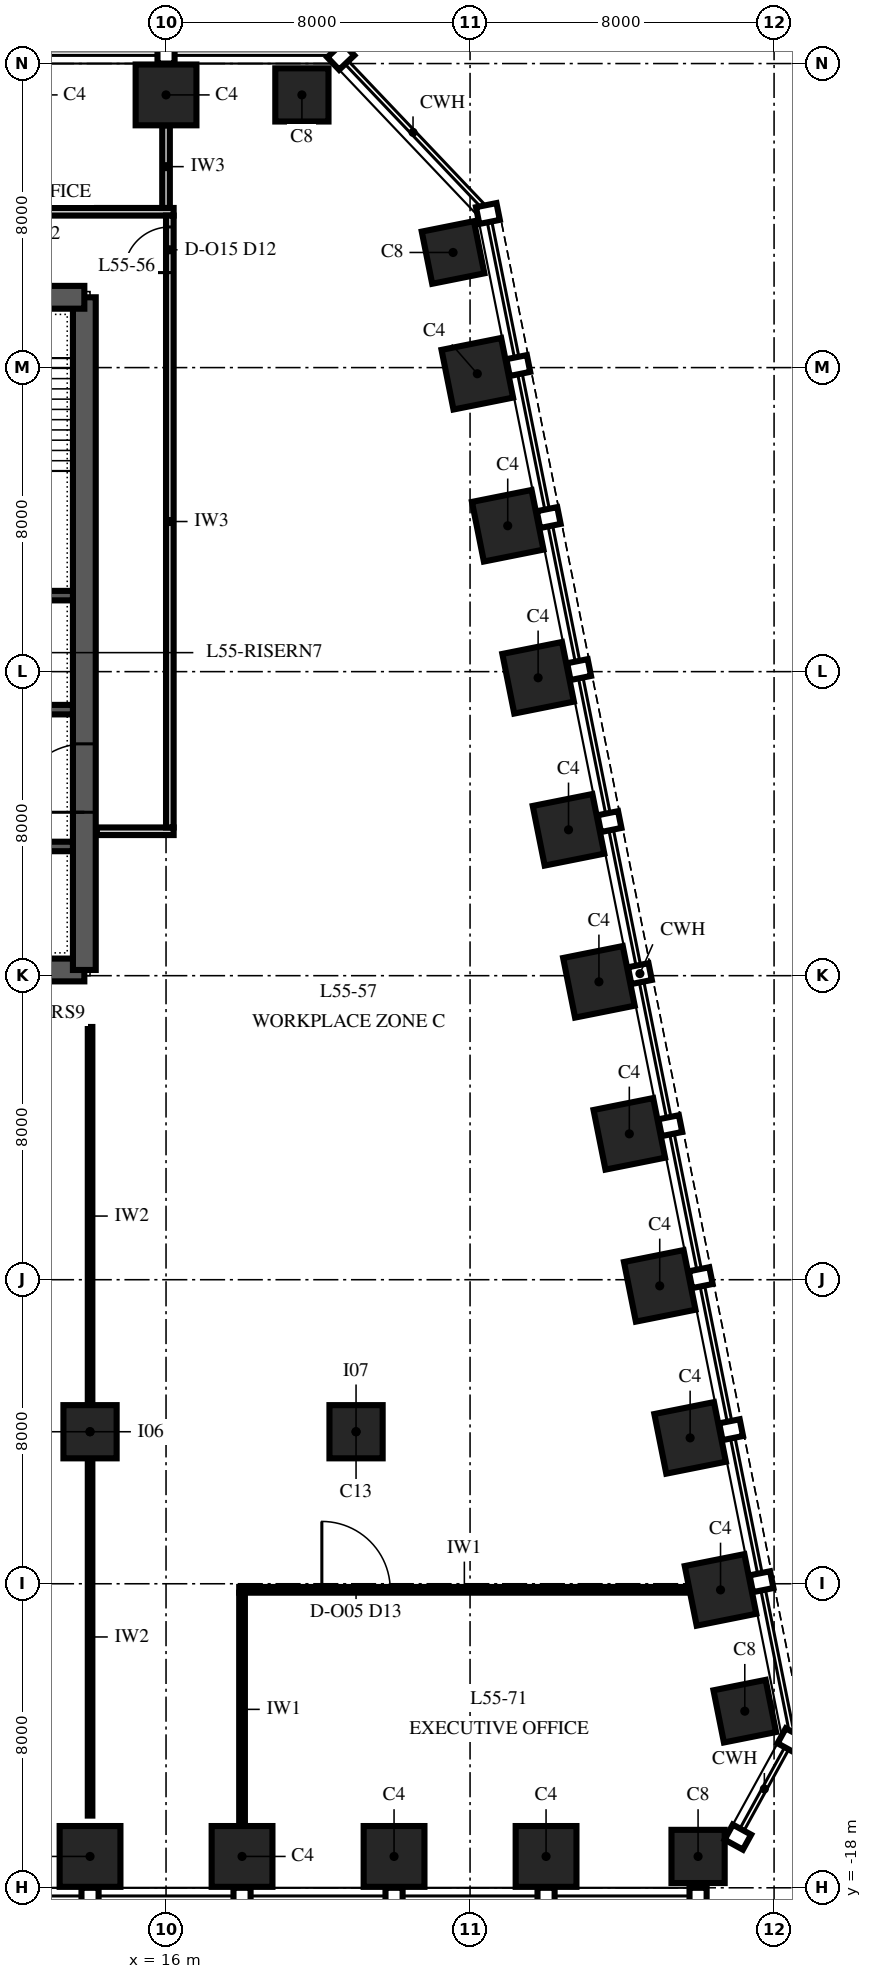
"""IFC4 building model, lengths in metres.
Left out: names, types, materials, properties, quantities, classifications, styles, units other than length and angle.
Written with IfcOpenShell. Run it as: python <this file> out.ifc"""

import sys

from ifc_helpers import new_model, si_unit, direction, frame, frame_2d, origin, origin_2d, place, context, subcontext, project, spatial, polyline, rectangle, outline, extrude, element, fill, save


model = new_model("IFC4")
c1 = context("Model", 3, precision=1e-05, world=origin(), true_north=direction((0.0, 1.0)))
c2 = subcontext(c1, "Body", "Model", "MODEL_VIEW")
j1 = project(units=[si_unit("LENGTHUNIT", "METRE"), si_unit("PLANEANGLEUNIT", "RADIAN")], contexts=[c1])
p1 = place(None, origin())
s1 = spatial("IfcSite", under=j1, at=p1, CompositionType="ELEMENT")
p2 = place(p1, origin())
s2 = spatial("IfcBuilding", under=s1, at=p2, CompositionType="ELEMENT")
p3 = place(p2, frame((0.0, 0.0, 238.0)))
s3 = spatial("IfcBuildingStorey", under=s2, at=p3, CompositionType="ELEMENT", Elevation=238.0)
for number, where, z_axis, x_axis in (
    (1, (14.0, -17.175, 0.0), (0.0, 0.0, 1.0), (1.0, 0.0, 0.0)),
    (2, (18.0, -17.175, 0.0), (0.0, 0.0, 1.0), (1.0, 0.0, 0.0)),
    (3, (22.0, -17.175, 0.0), (0.0, 0.0, 1.0), (1.0, 0.0, 0.0)),
    (4, (26.0, -17.175, 0.0), (0.0, 0.0, 1.0), (1.0, 0.0, 0.0)),
):
    element("IfcColumn", number, at=place(p3, frame(where, z_axis=z_axis, x_axis=x_axis)), inside=s3, PredefinedType="COLUMN", context=c2, shape_type="SweptSolid", body=[
        extrude(rectangle(XDim=1.6, YDim=1.6, at=origin_2d()), origin(), (0.0, 0.0, 1.0), 4.0),
    ])
for number, where, z_axis, x_axis in (
    (5, (30.0, -17.175, 0.0), (0.0, 0.0, 1.0), (1.0, 0.0, 0.0)),
    (6, (31.229, -13.353, 0.0), (0.0, 0.0, 1.0), (-0.196, 0.981, 0.0)),
):
    element("IfcColumn", number, at=place(p3, frame(where, z_axis=z_axis, x_axis=x_axis)), inside=s3, PredefinedType="COLUMN", context=c2, shape_type="SweptSolid", body=[
        extrude(rectangle(XDim=1.4, YDim=1.4, at=origin_2d()), origin(), (0.0, 0.0, 1.0), 4.0),
    ])
for number, where, z_axis, x_axis in (
    (7, (30.591, -10.162, 0.0), (0.0, 0.0, 1.0), (-0.196, 0.981, 0.0)),
    (8, (29.791, -6.162, 0.0), (0.0, 0.0, 1.0), (-0.196, 0.981, 0.0)),
    (9, (28.991, -2.162, 0.0), (0.0, 0.0, 1.0), (-0.196, 0.981, 0.0)),
    (10, (28.191, 1.838, 0.0), (0.0, 0.0, 1.0), (-0.196, 0.981, 0.0)),
    (11, (27.391, 5.838, 0.0), (0.0, 0.0, 1.0), (-0.196, 0.981, 0.0)),
    (12, (26.591, 9.838, 0.0), (0.0, 0.0, 1.0), (-0.196, 0.981, 0.0)),
    (13, (25.791, 13.838, 0.0), (0.0, 0.0, 1.0), (-0.196, 0.981, 0.0)),
    (14, (24.991, 17.838, 0.0), (0.0, 0.0, 1.0), (-0.196, 0.981, 0.0)),
    (15, (24.191, 21.838, 0.0), (0.0, 0.0, 1.0), (-0.196, 0.981, 0.0)),
):
    element("IfcColumn", number, at=place(p3, frame(where, z_axis=z_axis, x_axis=x_axis)), inside=s3, PredefinedType="COLUMN", context=c2, shape_type="SweptSolid", body=[
        extrude(rectangle(XDim=1.6, YDim=1.6, at=origin_2d()), origin(), (0.0, 0.0, 1.0), 4.0),
    ])
for number, where, z_axis, x_axis in (
    (16, (23.553, 25.029, 0.0), (0.0, 0.0, 1.0), (-0.196, 0.981, 0.0)),
    (17, (19.575, 29.175, 0.0), (0.0, 0.0, 1.0), (-1.0, 0.0, 0.0)),
):
    element("IfcColumn", number, at=place(p3, frame(where, z_axis=z_axis, x_axis=x_axis)), inside=s3, PredefinedType="COLUMN", context=c2, shape_type="SweptSolid", body=[
        extrude(rectangle(XDim=1.4, YDim=1.4, at=origin_2d()), origin(), (0.0, 0.0, 1.0), 4.0),
    ])
p4 = place(p3, frame((16.0, 29.175, 0.0), z_axis=(0.0, 0.0, 1.0), x_axis=(-1.0, 0.0, 0.0)))
e18 = element("IfcColumn", 18, at=p4, inside=s3, PredefinedType="COLUMN", context=c2, shape_type="SweptSolid", body=[
    extrude(rectangle(XDim=1.6, YDim=1.6, at=origin_2d()), origin(), (0.0, 0.0, 1.0), 4.0),
])
for number, where, z_axis, x_axis in (
    (19, (14.0, -6.0, 0.0), (0.0, 0.0, 1.0), (1.0, 0.0, 0.0)),
    (20, (21.0, -6.0, 0.0), (0.0, 0.0, 1.0), (1.0, 0.0, 0.0)),
):
    element("IfcColumn", number, at=place(p3, frame(where, z_axis=z_axis, x_axis=x_axis)), inside=s3, PredefinedType="COLUMN", context=c2, shape_type="SweptSolid", body=[
        extrude(rectangle(XDim=1.4, YDim=1.4, at=origin_2d()), origin(), (0.0, 0.0, 1.0), 4.0),
    ])
p5 = place(p3, frame((-13.85, 6.15, 0.0), z_axis=(0.0, 0.0, 1.0), x_axis=(1.0, 0.0, 0.0)))
e21 = element("IfcWall", 21, at=p5, inside=s3, PredefinedType="SHEAR", context=c2, shape_type="SweptSolid", body=[
    extrude(rectangle(XDim=27.7, YDim=0.6, at=frame_2d((13.85, 0.0))), origin(), (0.0, 0.0, 1.0), 4.0),
])
p6 = place(p3, frame((13.85, 6.15, 0.0), z_axis=(0.0, 0.0, 1.0), x_axis=(0.0, 1.0, 0.0)))
e22 = element("IfcWall", 22, at=p6, inside=s3, PredefinedType="SHEAR", context=c2, shape_type="SweptSolid", body=[
    extrude(outline(polyline([(0.0, -0.3), (17.7, -0.3), (17.7, 0.0), (17.4, 0.0), (17.4, 0.3), (0.3, 0.3), (0.3, 0.0), (0.0, 0.0), (0.0, -0.3)])), origin(), (0.0, 0.0, 1.0), 4.0),
])
p7 = place(p6, frame((4.15, 0.0, 0.0)))
e23 = element("IfcOpeningElement", 23, at=p7, cuts=e22, PredefinedType="OPENING", context=c2, shape_type="SweptSolid", body=[
    extrude(rectangle(XDim=1.8, YDim=2.4, at=frame_2d((0.9, 1.2))), frame((0.0, 0.315, 0.0), z_axis=(0.0, -1.0, 0.0), x_axis=(1.0, 0.0, 0.0)), (0.0, 0.0, 1.0), 0.63),
])
p8 = place(p3, frame((13.85, 23.85, 0.0), z_axis=(0.0, 0.0, 1.0), x_axis=(-1.0, 0.0, 0.0)))
e24 = element("IfcWall", 24, at=p8, inside=s3, PredefinedType="SHEAR", context=c2, shape_type="SweptSolid", body=[
    extrude(rectangle(XDim=27.7, YDim=0.6, at=frame_2d((13.85, 0.0))), origin(), (0.0, 0.0, 1.0), 4.0),
])
p9 = place(p8, frame((21.75, 0.0, 0.0)))
e25 = element("IfcOpeningElement", 25, at=p9, cuts=e24, PredefinedType="OPENING", context=c2, shape_type="SweptSolid", body=[
    extrude(rectangle(XDim=1.0, YDim=2.1, at=frame_2d((0.5, 1.05))), frame((0.0, 0.315, 0.0), z_axis=(0.0, -1.0, 0.0), x_axis=(1.0, 0.0, 0.0)), (0.0, 0.0, 1.0), 0.63),
])
p10 = place(p8, frame((4.95, 0.0, 0.0)))
e26 = element("IfcOpeningElement", 26, at=p10, cuts=e24, PredefinedType="OPENING", context=c2, shape_type="SweptSolid", body=[
    extrude(rectangle(XDim=1.0, YDim=2.1, at=frame_2d((0.5, 1.05))), frame((0.0, 0.315, 0.0), z_axis=(0.0, -1.0, 0.0), x_axis=(1.0, 0.0, 0.0)), (0.0, 0.0, 1.0), 0.63),
])
p11 = place(p8, frame((17.35, 0.0, 0.0)))
e27 = element("IfcOpeningElement", 27, at=p11, cuts=e24, PredefinedType="OPENING", context=c2, shape_type="SweptSolid", body=[
    extrude(rectangle(XDim=1.0, YDim=2.1, at=frame_2d((0.5, 1.05))), frame((0.0, 0.315, 0.0), z_axis=(0.0, -1.0, 0.0), x_axis=(1.0, 0.0, 0.0)), (0.0, 0.0, 1.0), 0.63),
])
p12 = place(p8, frame((13.35, 0.0, 0.0)))
e28 = element("IfcOpeningElement", 28, at=p12, cuts=e24, PredefinedType="OPENING", context=c2, shape_type="SweptSolid", body=[
    extrude(rectangle(XDim=1.0, YDim=2.1, at=frame_2d((0.5, 1.05))), frame((0.0, 0.315, 0.0), z_axis=(0.0, -1.0, 0.0), x_axis=(1.0, 0.0, 0.0)), (0.0, 0.0, 1.0), 0.63),
])
p13 = place(p8, frame((9.35, 0.0, 0.0)))
e29 = element("IfcOpeningElement", 29, at=p13, cuts=e24, PredefinedType="OPENING", context=c2, shape_type="SweptSolid", body=[
    extrude(rectangle(XDim=1.0, YDim=2.1, at=frame_2d((0.5, 1.05))), frame((0.0, 0.315, 0.0), z_axis=(0.0, -1.0, 0.0), x_axis=(1.0, 0.0, 0.0)), (0.0, 0.0, 1.0), 0.63),
])
p14 = place(p3, frame((-13.55, 9.4, 0.0), z_axis=(0.0, 0.0, 1.0), x_axis=(1.0, 0.0, 0.0)))
e30 = element("IfcWall", 30, at=p14, inside=s3, PredefinedType="SHEAR", context=c2, shape_type="SweptSolid", body=[
    extrude(rectangle(XDim=27.1, YDim=0.25, at=frame_2d((13.55, 0.0))), origin(), (0.0, 0.0, 1.0), 4.0),
])
p15 = place(p14, frame((0.4, 0.0, 0.0)))
e31 = element("IfcOpeningElement", 31, at=p15, cuts=e30, PredefinedType="OPENING", context=c2, shape_type="SweptSolid", body=[
    extrude(rectangle(XDim=1.1, YDim=2.1, at=frame_2d((0.55, 1.05))), frame((0.0, 0.14, 0.0), z_axis=(0.0, -1.0, 0.0), x_axis=(1.0, 0.0, 0.0)), (0.0, 0.0, 1.0), 0.28),
])
p16 = place(p14, frame((3.2, 0.0, 0.0)))
e32 = element("IfcOpeningElement", 32, at=p16, cuts=e30, PredefinedType="OPENING", context=c2, shape_type="SweptSolid", body=[
    extrude(rectangle(XDim=1.1, YDim=2.1, at=frame_2d((0.55, 1.05))), frame((0.0, 0.14, 0.0), z_axis=(0.0, -1.0, 0.0), x_axis=(1.0, 0.0, 0.0)), (0.0, 0.0, 1.0), 0.28),
])
p17 = place(p14, frame((6.0, 0.0, 0.0)))
e33 = element("IfcOpeningElement", 33, at=p17, cuts=e30, PredefinedType="OPENING", context=c2, shape_type="SweptSolid", body=[
    extrude(rectangle(XDim=1.1, YDim=2.1, at=frame_2d((0.55, 1.05))), frame((0.0, 0.14, 0.0), z_axis=(0.0, -1.0, 0.0), x_axis=(1.0, 0.0, 0.0)), (0.0, 0.0, 1.0), 0.28),
])
p18 = place(p14, frame((17.3, 0.0, 0.0)))
e34 = element("IfcOpeningElement", 34, at=p18, cuts=e30, PredefinedType="OPENING", context=c2, shape_type="SweptSolid", body=[
    extrude(rectangle(XDim=0.9, YDim=2.1, at=frame_2d((0.45, 1.05))), frame((0.0, 0.14, 0.0), z_axis=(0.0, -1.0, 0.0), x_axis=(1.0, 0.0, 0.0)), (0.0, 0.0, 1.0), 0.28),
])
p19 = place(p14, frame((20.1, 0.0, 0.0)))
e35 = element("IfcOpeningElement", 35, at=p19, cuts=e30, PredefinedType="OPENING", context=c2, shape_type="SweptSolid", body=[
    extrude(rectangle(XDim=0.9, YDim=2.1, at=frame_2d((0.45, 1.05))), frame((0.0, 0.14, 0.0), z_axis=(0.0, -1.0, 0.0), x_axis=(1.0, 0.0, 0.0)), (0.0, 0.0, 1.0), 0.28),
])
p20 = place(p14, frame((22.9, 0.0, 0.0)))
e36 = element("IfcOpeningElement", 36, at=p20, cuts=e30, PredefinedType="OPENING", context=c2, shape_type="SweptSolid", body=[
    extrude(rectangle(XDim=0.9, YDim=2.1, at=frame_2d((0.45, 1.05))), frame((0.0, 0.14, 0.0), z_axis=(0.0, -1.0, 0.0), x_axis=(1.0, 0.0, 0.0)), (0.0, 0.0, 1.0), 0.28),
])
p21 = place(p3, frame((-13.55, 13.0, 0.0), z_axis=(0.0, 0.0, 1.0), x_axis=(1.0, 0.0, 0.0)))
e37 = element("IfcWall", 37, at=p21, inside=s3, PredefinedType="SHEAR", context=c2, shape_type="SweptSolid", body=[
    extrude(rectangle(XDim=27.1, YDim=0.25, at=frame_2d((13.55, 0.0))), origin(), (0.0, 0.0, 1.0), 4.0),
])
p22 = place(p21, frame((0.4, 0.0, 0.0)))
e38 = element("IfcOpeningElement", 38, at=p22, cuts=e37, PredefinedType="OPENING", context=c2, shape_type="SweptSolid", body=[
    extrude(rectangle(XDim=1.1, YDim=2.1, at=frame_2d((0.55, 1.05))), frame((0.0, 0.14, 0.0), z_axis=(0.0, -1.0, 0.0), x_axis=(1.0, 0.0, 0.0)), (0.0, 0.0, 1.0), 0.28),
])
p23 = place(p21, frame((3.2, 0.0, 0.0)))
e39 = element("IfcOpeningElement", 39, at=p23, cuts=e37, PredefinedType="OPENING", context=c2, shape_type="SweptSolid", body=[
    extrude(rectangle(XDim=1.1, YDim=2.1, at=frame_2d((0.55, 1.05))), frame((0.0, 0.14, 0.0), z_axis=(0.0, -1.0, 0.0), x_axis=(1.0, 0.0, 0.0)), (0.0, 0.0, 1.0), 0.28),
])
p24 = place(p21, frame((6.0, 0.0, 0.0)))
e40 = element("IfcOpeningElement", 40, at=p24, cuts=e37, PredefinedType="OPENING", context=c2, shape_type="SweptSolid", body=[
    extrude(rectangle(XDim=1.1, YDim=2.1, at=frame_2d((0.55, 1.05))), frame((0.0, 0.14, 0.0), z_axis=(0.0, -1.0, 0.0), x_axis=(1.0, 0.0, 0.0)), (0.0, 0.0, 1.0), 0.28),
])
p25 = place(p21, frame((15.1, 0.0, 0.0)))
e41 = element("IfcOpeningElement", 41, at=p25, cuts=e37, PredefinedType="OPENING", context=c2, shape_type="SweptSolid", body=[
    extrude(rectangle(XDim=0.9, YDim=2.1, at=frame_2d((0.45, 1.05))), frame((0.0, 0.14, 0.0), z_axis=(0.0, -1.0, 0.0), x_axis=(1.0, 0.0, 0.0)), (0.0, 0.0, 1.0), 0.28),
])
p26 = place(p21, frame((17.5, 0.0, 0.0)))
e42 = element("IfcOpeningElement", 42, at=p26, cuts=e37, PredefinedType="OPENING", context=c2, shape_type="SweptSolid", body=[
    extrude(rectangle(XDim=0.9, YDim=2.1, at=frame_2d((0.45, 1.05))), frame((0.0, 0.14, 0.0), z_axis=(0.0, -1.0, 0.0), x_axis=(1.0, 0.0, 0.0)), (0.0, 0.0, 1.0), 0.28),
])
p27 = place(p21, frame((21.1, 0.0, 0.0)))
e43 = element("IfcOpeningElement", 43, at=p27, cuts=e37, PredefinedType="OPENING", context=c2, shape_type="SweptSolid", body=[
    extrude(rectangle(XDim=0.9, YDim=2.1, at=frame_2d((0.45, 1.05))), frame((0.0, 0.14, 0.0), z_axis=(0.0, -1.0, 0.0), x_axis=(1.0, 0.0, 0.0)), (0.0, 0.0, 1.0), 0.28),
])
p28 = place(p3, frame((-13.55, 16.0, 0.0), z_axis=(0.0, 0.0, 1.0), x_axis=(1.0, 0.0, 0.0)))
e44 = element("IfcWall", 44, at=p28, inside=s3, PredefinedType="SHEAR", context=c2, shape_type="SweptSolid", body=[
    extrude(rectangle(XDim=27.1, YDim=0.25, at=frame_2d((13.55, 0.0))), origin(), (0.0, 0.0, 1.0), 4.0),
])
p29 = place(p3, frame((17.925, -10.16, 0.0), z_axis=(0.0, 0.0, 1.0), x_axis=(1.0, 0.0, 0.0)))
e45 = element("IfcWall", 45, at=p29, inside=s3, PredefinedType="PARTITIONING", context=c2, shape_type="SweptSolid", body=[
    extrude(rectangle(XDim=11.85, YDim=0.15, at=frame_2d((5.925, 0.0))), origin(), (0.0, 0.0, 1.0), 3.13),
])
p30 = place(p29, frame((2.175, 0.0, 0.0)))
e46 = element("IfcOpeningElement", 46, at=p30, cuts=e45, PredefinedType="OPENING", context=c2, shape_type="SweptSolid", body=[
    extrude(rectangle(XDim=1.8, YDim=2.4, at=frame_2d((0.9, 1.2))), frame((0.0, 0.09, 0.0), z_axis=(0.0, -1.0, 0.0), x_axis=(1.0, 0.0, 0.0)), (0.0, 0.0, 1.0), 0.18),
])
p31 = place(p3, frame((14.18, 9.8, 0.0), z_axis=(0.0, 0.0, 1.0), x_axis=(1.0, 0.0, 0.0)))
e47 = element("IfcWall", 47, at=p31, inside=s3, PredefinedType="PARTITIONING", context=c2, shape_type="SweptSolid", body=[
    extrude(rectangle(XDim=2.02, YDim=0.2, at=frame_2d((1.01, 0.0))), origin(), (0.0, 0.0, 1.0), 3.75),
])
p32 = place(p3, frame((-15.9, 26.1, 0.0), z_axis=(0.0, 0.0, 1.0), x_axis=(1.0, 0.0, 0.0)))
e48 = element("IfcWall", 48, at=p32, inside=s3, PredefinedType="PARTITIONING", context=c2, shape_type="SweptSolid", body=[
    extrude(rectangle(XDim=32.1, YDim=0.2, at=frame_2d((16.05, 0.0))), origin(), (0.0, 0.0, 1.0), 3.318),
])
p33 = place(p32, frame((3.3, 0.0, 0.0)))
e49 = element("IfcOpeningElement", 49, at=p33, cuts=e48, PredefinedType="OPENING", context=c2, shape_type="SweptSolid", body=[
    extrude(rectangle(XDim=1.2, YDim=2.4, at=frame_2d((0.6, 1.2))), frame((0.0, 0.115, 0.0), z_axis=(0.0, -1.0, 0.0), x_axis=(1.0, 0.0, 0.0)), (0.0, 0.0, 1.0), 0.23),
])
p34 = place(p32, frame((9.3, 0.0, 0.0)))
e50 = element("IfcOpeningElement", 50, at=p34, cuts=e48, PredefinedType="OPENING", context=c2, shape_type="SweptSolid", body=[
    extrude(rectangle(XDim=1.2, YDim=2.4, at=frame_2d((0.6, 1.2))), frame((0.0, 0.115, 0.0), z_axis=(0.0, -1.0, 0.0), x_axis=(1.0, 0.0, 0.0)), (0.0, 0.0, 1.0), 0.23),
])
p35 = place(p32, frame((15.3, 0.0, 0.0)))
e51 = element("IfcOpeningElement", 51, at=p35, cuts=e48, PredefinedType="OPENING", context=c2, shape_type="SweptSolid", body=[
    extrude(rectangle(XDim=1.2, YDim=2.4, at=frame_2d((0.6, 1.2))), frame((0.0, 0.115, 0.0), z_axis=(0.0, -1.0, 0.0), x_axis=(1.0, 0.0, 0.0)), (0.0, 0.0, 1.0), 0.23),
])
p36 = place(p32, frame((21.3, 0.0, 0.0)))
e52 = element("IfcOpeningElement", 52, at=p36, cuts=e48, PredefinedType="OPENING", context=c2, shape_type="SweptSolid", body=[
    extrude(rectangle(XDim=1.2, YDim=2.4, at=frame_2d((0.6, 1.2))), frame((0.0, 0.115, 0.0), z_axis=(0.0, -1.0, 0.0), x_axis=(1.0, 0.0, 0.0)), (0.0, 0.0, 1.0), 0.23),
])
p37 = place(p32, frame((27.3, 0.0, 0.0)))
e53 = element("IfcOpeningElement", 53, at=p37, cuts=e48, PredefinedType="OPENING", context=c2, shape_type="SweptSolid", body=[
    extrude(rectangle(XDim=1.2, YDim=2.4, at=frame_2d((0.6, 1.2))), frame((0.0, 0.115, 0.0), z_axis=(0.0, -1.0, 0.0), x_axis=(1.0, 0.0, 0.0)), (0.0, 0.0, 1.0), 0.23),
])
p38 = place(p3, frame((16.0, 26.2, 0.0), z_axis=(0.0, 0.0, 1.0), x_axis=(0.0, 1.0, 0.0)))
e54 = element("IfcWall", 54, at=p38, inside=s3, PredefinedType="PARTITIONING", context=c2, shape_type="SweptSolid", body=[
    extrude(rectangle(XDim=2.175, YDim=0.2, at=frame_2d((1.087, 0.0))), origin(), (0.0, 0.0, 1.0), 3.318),
])
p39 = place(p3, frame((16.1, 9.9, 0.0), z_axis=(0.0, 0.0, 1.0), x_axis=(0.0, 1.0, 0.0)))
e55 = element("IfcWall", 55, at=p39, inside=s3, PredefinedType="PARTITIONING", context=c2, shape_type="SweptSolid", body=[
    extrude(rectangle(XDim=16.1, YDim=0.2, at=frame_2d((8.05, 0.0))), origin(), (0.0, 0.0, 1.0), 3.13),
])
p40 = place(p39, frame((14.6, 0.0, 0.0)))
e56 = element("IfcOpeningElement", 56, at=p40, cuts=e55, PredefinedType="OPENING", context=c2, shape_type="SweptSolid", body=[
    extrude(rectangle(XDim=1.2, YDim=2.4, at=frame_2d((0.6, 1.2))), frame((0.0, 0.115, 0.0), z_axis=(0.0, -1.0, 0.0), x_axis=(1.0, 0.0, 0.0)), (0.0, 0.0, 1.0), 0.23),
])
p41 = place(p3, frame((18.0, -16.375, 0.0), z_axis=(0.0, 0.0, 1.0), x_axis=(0.0, 1.0, 0.0)))
e57 = element("IfcWall", 57, at=p41, inside=s3, PredefinedType="PARTITIONING", context=c2, shape_type="SweptSolid", body=[
    extrude(rectangle(XDim=6.14, YDim=0.15, at=frame_2d((3.07, 0.0))), origin(), (0.0, 0.0, 1.0), 3.13),
])
p42 = place(p3, frame((14.001, -16.1, 0.0), z_axis=(0.0, 0.0, 1.0), x_axis=(0.0, 1.0, 0.0)))
e58 = element("IfcWall", 58, at=p42, inside=s3, PredefinedType="PARTITIONING", context=c2, shape_type="SweptSolid", body=[
    extrude(rectangle(XDim=9.4, YDim=0.12, at=frame_2d((4.7, 0.0))), origin(), (0.0, 0.0, 1.0), 3.13),
])
p43 = place(p3, frame((14.001, -5.3, 0.0), z_axis=(0.0, 0.0, 1.0), x_axis=(0.0, 1.0, 0.0)))
e59 = element("IfcWall", 59, at=p43, inside=s3, PredefinedType="PARTITIONING", context=c2, shape_type="SweptSolid", body=[
    extrude(rectangle(XDim=9.95, YDim=0.12, at=frame_2d((4.975, 0.0))), origin(), (0.0, 0.0, 1.0), 3.13),
])
p44 = place(p7, origin())
e60 = element("IfcDoor", 60, at=p44, inside=s3, OperationType="DOUBLE_DOOR_SINGLE_SWING", PredefinedType="DOOR", context=c2, shape_type="SweptSolid", body=[
    extrude(rectangle(XDim=1.8, YDim=2.4, at=frame_2d((0.9, 1.2))), frame((0.0, 0.3, 0.0), z_axis=(0.0, -1.0, 0.0), x_axis=(1.0, 0.0, 0.0)), (0.0, 0.0, 1.0), 0.6),
])
fill(e23, e60)
p45 = place(p30, origin())
e61 = element("IfcDoor", 61, at=p45, inside=s3, OperationType="DOUBLE_DOOR_SINGLE_SWING", PredefinedType="DOOR", context=c2, shape_type="SweptSolid", body=[
    extrude(rectangle(XDim=1.8, YDim=2.4, at=frame_2d((0.9, 1.2))), frame((0.0, 0.075, 0.0), z_axis=(0.0, -1.0, 0.0), x_axis=(1.0, 0.0, 0.0)), (0.0, 0.0, 1.0), 0.149),
])
fill(e46, e61)
p46 = place(p40, origin())
e62 = element("IfcDoor", 62, at=p46, inside=s3, OperationType="SINGLE_SWING_LEFT", PredefinedType="DOOR", context=c2, shape_type="SweptSolid", body=[
    extrude(rectangle(XDim=1.2, YDim=2.4, at=frame_2d((0.6, 1.2))), frame((0.0, 0.1, 0.0), z_axis=(0.0, -1.0, 0.0), x_axis=(1.0, 0.0, 0.0)), (0.0, 0.0, 1.0), 0.199),
])
fill(e56, e62)
save(model, sys.argv[1])
